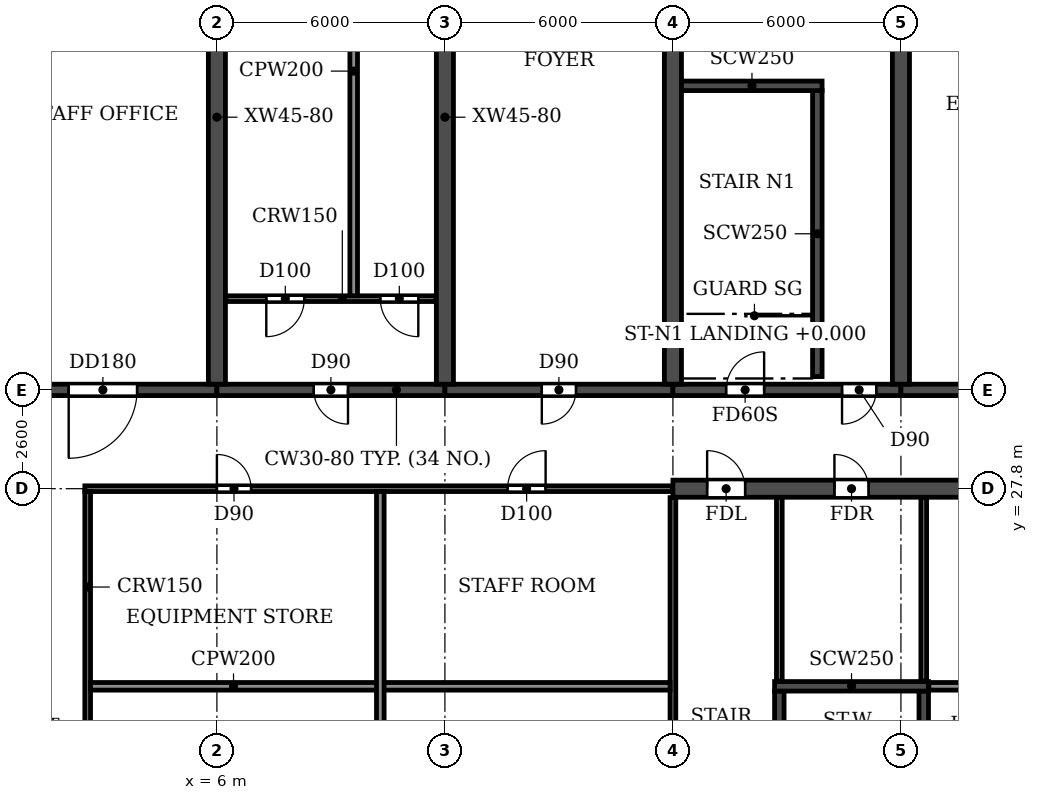
"""IFC4 building model, lengths in metres.
Left out: names, types, materials, properties, quantities, classifications, styles, units other than length and angle.
Written with IfcOpenShell. Run it as: python <this file> out.ifc"""

import sys

from ifc_helpers import new_model, si_unit, direction, frame, frame_2d, origin, place, context, subcontext, project, spatial, rectangle, extrude, element, fill, save


model = new_model("IFC4")
c1 = context("Model", 3, precision=1e-05, world=origin(), true_north=direction((0.0, 1.0)))
c2 = subcontext(c1, "Body", "Model", "MODEL_VIEW")
j1 = project(units=[si_unit("LENGTHUNIT", "METRE"), si_unit("PLANEANGLEUNIT", "RADIAN")], contexts=[c1])
p1 = place(None, origin())
s1 = spatial("IfcSite", under=j1, at=p1, CompositionType="ELEMENT")
p2 = place(p1, origin())
s2 = spatial("IfcBuilding", under=s1, at=p2, CompositionType="ELEMENT")
p3 = place(p2, frame((0.0, 0.0, 19.2)))
s3 = spatial("IfcBuildingStorey", under=s2, at=p3, CompositionType="ELEMENT", Elevation=19.2)
for number, where, z_axis, x_axis in (
    (1, (6.0, 30.55, 0.0), (0.0, 0.0, 1.0), (0.0, 1.0, 0.0)),
    (2, (12.0, 30.55, 0.0), (0.0, 0.0, 1.0), (0.0, 1.0, 0.0)),
    (3, (18.0, 30.55, 0.0), (0.0, 0.0, 1.0), (0.0, 1.0, 0.0)),
    (4, (24.0, 30.55, 0.0), (0.0, 0.0, 1.0), (0.0, 1.0, 0.0)),
):
    element("IfcWall", number, at=place(p3, frame(where, z_axis=z_axis, x_axis=x_axis)), inside=s3, PredefinedType="SHEAR", context=c2, shape_type="SweptSolid", body=[
        extrude(rectangle(XDim=14.05, YDim=0.45, at=frame_2d((7.025, 0.0))), origin(), (0.0, 0.0, 1.0), 3.95),
    ])
p4 = place(p3, frame((0.0, 30.4, 0.0), z_axis=(0.0, 0.0, 1.0), x_axis=(1.0, 0.0, 0.0)))
e5 = element("IfcWall", 5, at=p4, inside=s3, PredefinedType="SHEAR", context=c2, shape_type="SweptSolid", body=[
    extrude(rectangle(XDim=6.0, YDim=0.3, at=frame_2d((3.0, 0.0))), origin(), (0.0, 0.0, 1.0), 3.35),
])
p5 = place(p4, frame((2.1, 0.0, 0.0)))
e6 = element("IfcOpeningElement", 6, at=p5, cuts=e5, PredefinedType="OPENING", context=c2, shape_type="SweptSolid", body=[
    extrude(rectangle(XDim=1.8, YDim=2.1, at=frame_2d((0.9, 1.05))), frame((0.0, 0.16, 0.0), z_axis=(0.0, -1.0, 0.0), x_axis=(1.0, 0.0, 0.0)), (0.0, 0.0, 1.0), 0.32),
])
p6 = place(p3, frame((6.0, 30.4, 0.0), z_axis=(0.0, 0.0, 1.0), x_axis=(1.0, 0.0, 0.0)))
e7 = element("IfcWall", 7, at=p6, inside=s3, PredefinedType="SHEAR", context=c2, shape_type="SweptSolid", body=[
    extrude(rectangle(XDim=6.0, YDim=0.3, at=frame_2d((3.0, 0.0))), origin(), (0.0, 0.0, 1.0), 3.35),
])
p7 = place(p6, frame((2.55, 0.0, 0.0)))
e8 = element("IfcOpeningElement", 8, at=p7, cuts=e7, PredefinedType="OPENING", context=c2, shape_type="SweptSolid", body=[
    extrude(rectangle(XDim=0.9, YDim=2.1, at=frame_2d((0.45, 1.05))), frame((0.0, 0.16, 0.0), z_axis=(0.0, -1.0, 0.0), x_axis=(1.0, 0.0, 0.0)), (0.0, 0.0, 1.0), 0.32),
])
p8 = place(p3, frame((12.0, 30.4, 0.0), z_axis=(0.0, 0.0, 1.0), x_axis=(1.0, 0.0, 0.0)))
e9 = element("IfcWall", 9, at=p8, inside=s3, PredefinedType="SHEAR", context=c2, shape_type="SweptSolid", body=[
    extrude(rectangle(XDim=6.0, YDim=0.3, at=frame_2d((3.0, 0.0))), origin(), (0.0, 0.0, 1.0), 3.35),
])
p9 = place(p8, frame((2.55, 0.0, 0.0)))
e10 = element("IfcOpeningElement", 10, at=p9, cuts=e9, PredefinedType="OPENING", context=c2, shape_type="SweptSolid", body=[
    extrude(rectangle(XDim=0.9, YDim=2.1, at=frame_2d((0.45, 1.05))), frame((0.0, 0.16, 0.0), z_axis=(0.0, -1.0, 0.0), x_axis=(1.0, 0.0, 0.0)), (0.0, 0.0, 1.0), 0.32),
])
p10 = place(p3, frame((18.0, 30.4, 0.0), z_axis=(0.0, 0.0, 1.0), x_axis=(1.0, 0.0, 0.0)))
e11 = element("IfcWall", 11, at=p10, inside=s3, PredefinedType="SHEAR", context=c2, shape_type="SweptSolid", body=[
    extrude(rectangle(XDim=6.0, YDim=0.3, at=frame_2d((3.0, 0.0))), origin(), (0.0, 0.0, 1.0), 3.35),
])
p11 = place(p10, frame((1.4, 0.0, 0.0)))
e12 = element("IfcOpeningElement", 12, at=p11, cuts=e11, PredefinedType="OPENING", context=c2, shape_type="SweptSolid", body=[
    extrude(rectangle(XDim=1.0, YDim=2.1, at=frame_2d((0.5, 1.05))), frame((0.0, 0.16, 0.0), z_axis=(0.0, -1.0, 0.0), x_axis=(1.0, 0.0, 0.0)), (0.0, 0.0, 1.0), 0.32),
])
p12 = place(p10, frame((4.45, 0.0, 0.0)))
e13 = element("IfcOpeningElement", 13, at=p12, cuts=e11, PredefinedType="OPENING", context=c2, shape_type="SweptSolid", body=[
    extrude(rectangle(XDim=0.9, YDim=2.1, at=frame_2d((0.45, 1.05))), frame((0.0, 0.16, 0.0), z_axis=(0.0, -1.0, 0.0), x_axis=(1.0, 0.0, 0.0)), (0.0, 0.0, 1.0), 0.32),
])
p13 = place(p3, frame((24.0, 30.4, 0.0), z_axis=(0.0, 0.0, 1.0), x_axis=(1.0, 0.0, 0.0)))
e14 = element("IfcWall", 14, at=p13, inside=s3, PredefinedType="SHEAR", context=c2, shape_type="SweptSolid", body=[
    extrude(rectangle(XDim=6.0, YDim=0.3, at=frame_2d((3.0, 0.0))), origin(), (0.0, 0.0, 1.0), 3.35),
])
p14 = place(p13, frame((2.55, 0.0, 0.0)))
e15 = element("IfcOpeningElement", 15, at=p14, cuts=e14, PredefinedType="OPENING", context=c2, shape_type="SweptSolid", body=[
    extrude(rectangle(XDim=0.9, YDim=2.1, at=frame_2d((0.45, 1.05))), frame((0.0, 0.16, 0.0), z_axis=(0.0, -1.0, 0.0), x_axis=(1.0, 0.0, 0.0)), (0.0, 0.0, 1.0), 0.32),
])
p15 = place(p3, frame((18.0, 27.8, 0.0), z_axis=(0.0, 0.0, 1.0), x_axis=(1.0, 0.0, 0.0)))
e16 = element("IfcWall", 16, at=p15, inside=s3, PredefinedType="SOLIDWALL", context=c2, shape_type="SweptSolid", body=[
    extrude(rectangle(XDim=66.0, YDim=0.45, at=frame_2d((33.0, 0.0))), origin(), (0.0, 0.0, 1.0), 3.95),
])
p16 = place(p15, frame((0.9, 0.0, 0.0)))
e17 = element("IfcOpeningElement", 17, at=p16, cuts=e16, PredefinedType="OPENING", context=c2, shape_type="SweptSolid", body=[
    extrude(rectangle(XDim=1.0, YDim=2.1, at=frame_2d((0.5, 1.05))), frame((0.0, 0.235, 0.0), z_axis=(0.0, -1.0, 0.0), x_axis=(1.0, 0.0, 0.0)), (0.0, 0.0, 1.0), 0.47),
])
p17 = place(p15, frame((4.25, 0.0, 0.0)))
e18 = element("IfcOpeningElement", 18, at=p17, cuts=e16, PredefinedType="OPENING", context=c2, shape_type="SweptSolid", body=[
    extrude(rectangle(XDim=0.9, YDim=2.1, at=frame_2d((0.45, 1.05))), frame((0.0, 0.235, 0.0), z_axis=(0.0, -1.0, 0.0), x_axis=(1.0, 0.0, 0.0)), (0.0, 0.0, 1.0), 0.47),
])
p18 = place(p15, frame((8.8, 0.0, 0.0)))
e19 = element("IfcOpeningElement", 19, at=p18, cuts=e16, PredefinedType="OPENING", context=c2, shape_type="SweptSolid", body=[
    extrude(rectangle(XDim=1.0, YDim=2.1, at=frame_2d((0.5, 1.05))), frame((0.0, 0.235, 0.0), z_axis=(0.0, -1.0, 0.0), x_axis=(1.0, 0.0, 0.0)), (0.0, 0.0, 1.0), 0.47),
])
p19 = place(p15, frame((13.45, 0.0, 0.0)))
e20 = element("IfcOpeningElement", 20, at=p19, cuts=e16, PredefinedType="OPENING", context=c2, shape_type="SweptSolid", body=[
    extrude(rectangle(XDim=0.9, YDim=2.1, at=frame_2d((0.45, 1.05))), frame((0.0, 0.235, 0.0), z_axis=(0.0, -1.0, 0.0), x_axis=(1.0, 0.0, 0.0)), (0.0, 0.0, 1.0), 0.47),
])
p20 = place(p15, frame((17.9, 0.0, 0.0)))
e21 = element("IfcOpeningElement", 21, at=p20, cuts=e16, PredefinedType="OPENING", context=c2, shape_type="SweptSolid", body=[
    extrude(rectangle(XDim=1.0, YDim=2.1, at=frame_2d((0.5, 1.05))), frame((0.0, 0.235, 0.0), z_axis=(0.0, -1.0, 0.0), x_axis=(1.0, 0.0, 0.0)), (0.0, 0.0, 1.0), 0.47),
])
p21 = place(p15, frame((22.85, 0.0, 0.0)))
e22 = element("IfcOpeningElement", 22, at=p21, cuts=e16, PredefinedType="OPENING", context=c2, shape_type="SweptSolid", body=[
    extrude(rectangle(XDim=1.5, YDim=2.1, at=frame_2d((0.75, 1.05))), frame((0.0, 0.235, 0.0), z_axis=(0.0, -1.0, 0.0), x_axis=(1.0, 0.0, 0.0)), (0.0, 0.0, 1.0), 0.47),
])
p22 = place(p15, frame((29.6, 0.0, 0.0)))
e23 = element("IfcOpeningElement", 23, at=p22, cuts=e16, PredefinedType="OPENING", context=c2, shape_type="SweptSolid", body=[
    extrude(rectangle(XDim=1.0, YDim=2.1, at=frame_2d((0.5, 1.05))), frame((0.0, 0.235, 0.0), z_axis=(0.0, -1.0, 0.0), x_axis=(1.0, 0.0, 0.0)), (0.0, 0.0, 1.0), 0.47),
])
p23 = place(p15, frame((32.5, 0.0, 0.0)))
e24 = element("IfcOpeningElement", 24, at=p23, cuts=e16, PredefinedType="OPENING", context=c2, shape_type="SweptSolid", body=[
    extrude(rectangle(XDim=1.0, YDim=2.1, at=frame_2d((0.5, 1.05))), frame((0.0, 0.235, 0.0), z_axis=(0.0, -1.0, 0.0), x_axis=(1.0, 0.0, 0.0)), (0.0, 0.0, 1.0), 0.47),
])
p24 = place(p15, frame((38.0, 0.0, 0.0)))
e25 = element("IfcOpeningElement", 25, at=p24, cuts=e16, PredefinedType="OPENING", context=c2, shape_type="SweptSolid", body=[
    extrude(rectangle(XDim=1.0, YDim=2.1, at=frame_2d((0.5, 1.05))), frame((0.0, 0.235, 0.0), z_axis=(0.0, -1.0, 0.0), x_axis=(1.0, 0.0, 0.0)), (0.0, 0.0, 1.0), 0.47),
])
p25 = place(p15, frame((43.2, 0.0, 0.0)))
e26 = element("IfcOpeningElement", 26, at=p25, cuts=e16, PredefinedType="OPENING", context=c2, shape_type="SweptSolid", body=[
    extrude(rectangle(XDim=1.0, YDim=2.1, at=frame_2d((0.5, 1.05))), frame((0.0, 0.235, 0.0), z_axis=(0.0, -1.0, 0.0), x_axis=(1.0, 0.0, 0.0)), (0.0, 0.0, 1.0), 0.47),
])
p26 = place(p15, frame((47.1, 0.0, 0.0)))
e27 = element("IfcOpeningElement", 27, at=p26, cuts=e16, PredefinedType="OPENING", context=c2, shape_type="SweptSolid", body=[
    extrude(rectangle(XDim=1.0, YDim=2.1, at=frame_2d((0.5, 1.05))), frame((0.0, 0.235, 0.0), z_axis=(0.0, -1.0, 0.0), x_axis=(1.0, 0.0, 0.0)), (0.0, 0.0, 1.0), 0.47),
])
p27 = place(p15, frame((51.65, 0.0, 0.0)))
e28 = element("IfcOpeningElement", 28, at=p27, cuts=e16, PredefinedType="OPENING", context=c2, shape_type="SweptSolid", body=[
    extrude(rectangle(XDim=0.9, YDim=2.1, at=frame_2d((0.45, 1.05))), frame((0.0, 0.235, 0.0), z_axis=(0.0, -1.0, 0.0), x_axis=(1.0, 0.0, 0.0)), (0.0, 0.0, 1.0), 0.47),
])
p28 = place(p15, frame((56.2, 0.0, 0.0)))
e29 = element("IfcOpeningElement", 29, at=p28, cuts=e16, PredefinedType="OPENING", context=c2, shape_type="SweptSolid", body=[
    extrude(rectangle(XDim=1.0, YDim=2.1, at=frame_2d((0.5, 1.05))), frame((0.0, 0.235, 0.0), z_axis=(0.0, -1.0, 0.0), x_axis=(1.0, 0.0, 0.0)), (0.0, 0.0, 1.0), 0.47),
])
p29 = place(p15, frame((60.85, 0.0, 0.0)))
e30 = element("IfcOpeningElement", 30, at=p29, cuts=e16, PredefinedType="OPENING", context=c2, shape_type="SweptSolid", body=[
    extrude(rectangle(XDim=0.9, YDim=2.1, at=frame_2d((0.45, 1.05))), frame((0.0, 0.235, 0.0), z_axis=(0.0, -1.0, 0.0), x_axis=(1.0, 0.0, 0.0)), (0.0, 0.0, 1.0), 0.47),
])
p30 = place(p15, frame((64.1, 0.0, 0.0)))
e31 = element("IfcOpeningElement", 31, at=p30, cuts=e16, PredefinedType="OPENING", context=c2, shape_type="SweptSolid", body=[
    extrude(rectangle(XDim=1.0, YDim=2.1, at=frame_2d((0.5, 1.05))), frame((0.0, 0.235, 0.0), z_axis=(0.0, -1.0, 0.0), x_axis=(1.0, 0.0, 0.0)), (0.0, 0.0, 1.0), 0.47),
])
p31 = place(p3, frame((20.8, 14.825, 0.0), z_axis=(0.0, 0.0, 1.0), x_axis=(0.0, 1.0, 0.0)))
e32 = element("IfcWall", 32, at=p31, inside=s3, PredefinedType="SOLIDWALL", context=c2, shape_type="SweptSolid", body=[
    extrude(rectangle(XDim=7.65, YDim=0.25, at=frame_2d((3.825, 0.0))), origin(), (0.0, 0.0, 1.0), 3.95),
])
p32 = place(p31, frame((0.475, 0.0, 0.0)))
e33 = element("IfcOpeningElement", 33, at=p32, cuts=e32, PredefinedType="OPENING", context=c2, shape_type="SweptSolid", body=[
    extrude(rectangle(XDim=1.0, YDim=2.1, at=frame_2d((0.5, 1.05))), frame((0.0, 0.135, 0.0), z_axis=(0.0, -1.0, 0.0), x_axis=(1.0, 0.0, 0.0)), (0.0, 0.0, 1.0), 0.27),
])
p33 = place(p3, frame((24.6, 14.825, 0.0), z_axis=(0.0, 0.0, 1.0), x_axis=(0.0, 1.0, 0.0)))
e34 = element("IfcWall", 34, at=p33, inside=s3, PredefinedType="SOLIDWALL", context=c2, shape_type="SweptSolid", body=[
    extrude(rectangle(XDim=7.65, YDim=0.25, at=frame_2d((3.825, 0.0))), origin(), (0.0, 0.0, 1.0), 3.95),
])
p34 = place(p3, frame((20.675, 22.6, 0.0), z_axis=(0.0, 0.0, 1.0), x_axis=(1.0, 0.0, 0.0)))
e35 = element("IfcWall", 35, at=p34, inside=s3, PredefinedType="SOLIDWALL", context=c2, shape_type="SweptSolid", body=[
    extrude(rectangle(XDim=4.05, YDim=0.25, at=frame_2d((2.025, 0.0))), origin(), (0.0, 0.0, 1.0), 3.95),
])
p35 = place(p3, frame((21.8, 30.75, 0.0), z_axis=(0.0, 0.0, 1.0), x_axis=(0.0, 1.0, 0.0)))
e36 = element("IfcWall", 36, at=p35, inside=s3, PredefinedType="SOLIDWALL", context=c2, shape_type="SweptSolid", body=[
    extrude(rectangle(XDim=7.525, YDim=0.25, at=frame_2d((3.762, 0.0))), origin(), (0.0, 0.0, 1.0), 3.95),
])
p36 = place(p3, frame((18.0, 38.4, 0.0), z_axis=(0.0, 0.0, 1.0), x_axis=(1.0, 0.0, 0.0)))
e37 = element("IfcWall", 37, at=p36, inside=s3, PredefinedType="SOLIDWALL", context=c2, shape_type="SweptSolid", body=[
    extrude(rectangle(XDim=3.925, YDim=0.25, at=frame_2d((1.962, 0.0))), origin(), (0.0, 0.0, 1.0), 3.95),
])
p37 = place(p3, frame((2.525, 27.8, 0.0), z_axis=(0.0, 0.0, 1.0), x_axis=(1.0, 0.0, 0.0)))
e38 = element("IfcWall", 38, at=p37, inside=s3, PredefinedType="PARTITIONING", context=c2, shape_type="SweptSolid", body=[
    extrude(rectangle(XDim=15.465, YDim=0.15, at=frame_2d((7.732, 0.0))), origin(), (0.0, 0.0, 1.0), 3.95),
])
p38 = place(p37, frame((3.475, 0.0, 0.0)))
e39 = element("IfcOpeningElement", 39, at=p38, cuts=e38, PredefinedType="OPENING", context=c2, shape_type="SweptSolid", body=[
    extrude(rectangle(XDim=0.9, YDim=2.1, at=frame_2d((0.45, 1.05))), frame((0.0, 0.085, 0.0), z_axis=(0.0, -1.0, 0.0), x_axis=(1.0, 0.0, 0.0)), (0.0, 0.0, 1.0), 0.17),
])
p39 = place(p37, frame((11.125, 0.0, 0.0)))
e40 = element("IfcOpeningElement", 40, at=p39, cuts=e38, PredefinedType="OPENING", context=c2, shape_type="SweptSolid", body=[
    extrude(rectangle(XDim=1.0, YDim=2.1, at=frame_2d((0.5, 1.05))), frame((0.0, 0.085, 0.0), z_axis=(0.0, -1.0, 0.0), x_axis=(1.0, 0.0, 0.0)), (0.0, 0.0, 1.0), 0.17),
])
p40 = place(p3, frame((6.235, 32.8, 0.0), z_axis=(0.0, 0.0, 1.0), x_axis=(1.0, 0.0, 0.0)))
e41 = element("IfcWall", 41, at=p40, inside=s3, PredefinedType="PARTITIONING", context=c2, shape_type="SweptSolid", body=[
    extrude(rectangle(XDim=5.53, YDim=0.15, at=frame_2d((2.765, 0.0))), origin(), (0.0, 0.0, 1.0), 3.95),
])
p41 = place(p40, frame((1.065, 0.0, 0.0)))
e42 = element("IfcOpeningElement", 42, at=p41, cuts=e41, PredefinedType="OPENING", context=c2, shape_type="SweptSolid", body=[
    extrude(rectangle(XDim=1.0, YDim=2.1, at=frame_2d((0.5, 1.05))), frame((0.0, 0.085, 0.0), z_axis=(0.0, -1.0, 0.0), x_axis=(1.0, 0.0, 0.0)), (0.0, 0.0, 1.0), 0.17),
])
p42 = place(p40, frame((4.065, 0.0, 0.0)))
e43 = element("IfcOpeningElement", 43, at=p42, cuts=e41, PredefinedType="OPENING", context=c2, shape_type="SweptSolid", body=[
    extrude(rectangle(XDim=1.0, YDim=2.1, at=frame_2d((0.5, 1.05))), frame((0.0, 0.085, 0.0), z_axis=(0.0, -1.0, 0.0), x_axis=(1.0, 0.0, 0.0)), (0.0, 0.0, 1.0), 0.17),
])
p43 = place(p3, frame((2.6, 14.675, 0.0), z_axis=(0.0, 0.0, 1.0), x_axis=(0.0, 1.0, 0.0)))
e44 = element("IfcWall", 44, at=p43, inside=s3, PredefinedType="PARTITIONING", context=c2, shape_type="SweptSolid", body=[
    extrude(rectangle(XDim=13.05, YDim=0.15, at=frame_2d((6.525, 0.0))), origin(), (0.0, 0.0, 1.0), 3.95),
])
p44 = place(p43, frame((3.025, 0.0, 0.0)))
e45 = element("IfcOpeningElement", 45, at=p44, cuts=e44, PredefinedType="OPENING", context=c2, shape_type="SweptSolid", body=[
    extrude(rectangle(XDim=1.8, YDim=2.1, at=frame_2d((0.9, 1.05))), frame((0.0, 0.085, 0.0), z_axis=(0.0, -1.0, 0.0), x_axis=(1.0, 0.0, 0.0)), (0.0, 0.0, 1.0), 0.17),
])
p45 = place(p3, frame((18.0, 14.835, 0.0), z_axis=(0.0, 0.0, 1.0), x_axis=(0.0, 1.0, 0.0)))
e46 = element("IfcWall", 46, at=p45, inside=s3, PredefinedType="PARTITIONING", context=c2, shape_type="SweptSolid", body=[
    extrude(rectangle(XDim=12.73, YDim=0.15, at=frame_2d((6.365, 0.0))), origin(), (0.0, 0.0, 1.0), 3.95),
])
p46 = place(p3, frame((2.675, 22.6, 0.0), z_axis=(0.0, 0.0, 1.0), x_axis=(1.0, 0.0, 0.0)))
e47 = element("IfcWall", 47, at=p46, inside=s3, PredefinedType="PARTITIONING", context=c2, shape_type="SweptSolid", body=[
    extrude(rectangle(XDim=15.25, YDim=0.2, at=frame_2d((7.625, 0.0))), origin(), (0.0, 0.0, 1.0), 3.95),
])
p47 = place(p3, frame((24.735, 22.6, 0.0), z_axis=(0.0, 0.0, 1.0), x_axis=(1.0, 0.0, 0.0)))
e48 = element("IfcWall", 48, at=p47, inside=s3, PredefinedType="PARTITIONING", context=c2, shape_type="SweptSolid", body=[
    extrude(rectangle(XDim=5.13, YDim=0.2, at=frame_2d((2.565, 0.0))), origin(), (0.0, 0.0, 1.0), 3.95),
])
p48 = place(p3, frame((9.6, 32.875, 0.0), z_axis=(0.0, 0.0, 1.0), x_axis=(0.0, 1.0, 0.0)))
e49 = element("IfcWall", 49, at=p48, inside=s3, PredefinedType="PARTITIONING", context=c2, shape_type="SweptSolid", body=[
    extrude(rectangle(XDim=11.825, YDim=0.2, at=frame_2d((5.913, 0.0))), origin(), (0.0, 0.0, 1.0), 3.95),
])
p49 = place(p3, frame((10.3, 14.675, 0.0), z_axis=(0.0, 0.0, 1.0), x_axis=(0.0, 1.0, 0.0)))
e50 = element("IfcWall", 50, at=p49, inside=s3, PredefinedType="PARTITIONING", context=c2, shape_type="SweptSolid", body=[
    extrude(rectangle(XDim=13.05, YDim=0.2, at=frame_2d((6.525, 0.0))), origin(), (0.0, 0.0, 1.0), 3.95),
])
for number, where, z_axis, x_axis in (
    (51, (20.8, 22.735, 0.0), (0.0, 0.0, 1.0), (0.0, 1.0, 0.0)),
    (52, (24.6, 22.735, 0.0), (0.0, 0.0, 1.0), (0.0, 1.0, 0.0)),
):
    element("IfcWall", number, at=place(p3, frame(where, z_axis=z_axis, x_axis=x_axis)), inside=s3, PredefinedType="PARTITIONING", context=c2, shape_type="SweptSolid", body=[
        extrude(rectangle(XDim=4.83, YDim=0.15, at=frame_2d((2.415, 0.0))), origin(), (0.0, 0.0, 1.0), 3.95),
    ])
p50 = place(p5, frame((1.8, 0.0, 0.0), z_axis=(0.0, 0.0, 1.0), x_axis=(-1.0, 0.0, 0.0)))
e53 = element("IfcDoor", 53, at=p50, inside=s3, OperationType="DOUBLE_DOOR_SINGLE_SWING", PredefinedType="DOOR", context=c2, shape_type="SweptSolid", body=[
    extrude(rectangle(XDim=1.8, YDim=2.1, at=frame_2d((0.9, 1.05))), frame((0.0, 0.025, 0.0), z_axis=(0.0, -1.0, 0.0), x_axis=(1.0, 0.0, 0.0)), (0.0, 0.0, 1.0), 0.05),
])
fill(e6, e53)
p51 = place(p38, origin())
e54 = element("IfcDoor", 54, at=p51, inside=s3, OperationType="SINGLE_SWING_LEFT", PredefinedType="DOOR", context=c2, shape_type="SweptSolid", body=[
    extrude(rectangle(XDim=0.9, YDim=2.1, at=frame_2d((0.45, 1.05))), frame((0.0, 0.025, 0.0), z_axis=(0.0, -1.0, 0.0), x_axis=(1.0, 0.0, 0.0)), (0.0, 0.0, 1.0), 0.05),
])
fill(e39, e54)
p52 = place(p7, frame((0.9, 0.0, 0.0), z_axis=(0.0, 0.0, 1.0), x_axis=(-1.0, 0.0, 0.0)))
e55 = element("IfcDoor", 55, at=p52, inside=s3, OperationType="SINGLE_SWING_LEFT", PredefinedType="DOOR", context=c2, shape_type="SweptSolid", body=[
    extrude(rectangle(XDim=0.9, YDim=2.1, at=frame_2d((0.45, 1.05))), frame((0.0, 0.025, 0.0), z_axis=(0.0, -1.0, 0.0), x_axis=(1.0, 0.0, 0.0)), (0.0, 0.0, 1.0), 0.05),
])
fill(e8, e55)
p53 = place(p39, origin())
e56 = element("IfcDoor", 56, at=p53, inside=s3, OperationType="SINGLE_SWING_RIGHT", PredefinedType="DOOR", context=c2, shape_type="SweptSolid", body=[
    extrude(rectangle(XDim=1.0, YDim=2.1, at=frame_2d((0.5, 1.05))), frame((0.0, 0.025, 0.0), z_axis=(0.0, -1.0, 0.0), x_axis=(1.0, 0.0, 0.0)), (0.0, 0.0, 1.0), 0.05),
])
fill(e40, e56)
p54 = place(p9, frame((0.9, 0.0, 0.0), z_axis=(0.0, 0.0, 1.0), x_axis=(-1.0, 0.0, 0.0)))
e57 = element("IfcDoor", 57, at=p54, inside=s3, OperationType="SINGLE_SWING_RIGHT", PredefinedType="DOOR", context=c2, shape_type="SweptSolid", body=[
    extrude(rectangle(XDim=0.9, YDim=2.1, at=frame_2d((0.45, 1.05))), frame((0.0, 0.025, 0.0), z_axis=(0.0, -1.0, 0.0), x_axis=(1.0, 0.0, 0.0)), (0.0, 0.0, 1.0), 0.05),
])
fill(e10, e57)
p55 = place(p16, origin())
e58 = element("IfcDoor", 58, at=p55, inside=s3, OperationType="SINGLE_SWING_LEFT", PredefinedType="DOOR", context=c2, shape_type="SweptSolid", body=[
    extrude(rectangle(XDim=1.0, YDim=2.1, at=frame_2d((0.5, 1.05))), frame((0.0, 0.025, 0.0), z_axis=(0.0, -1.0, 0.0), x_axis=(1.0, 0.0, 0.0)), (0.0, 0.0, 1.0), 0.05),
])
fill(e17, e58)
p56 = place(p11, origin())
e59 = element("IfcDoor", 59, at=p56, inside=s3, OperationType="SINGLE_SWING_RIGHT", PredefinedType="DOOR", context=c2, shape_type="SweptSolid", body=[
    extrude(rectangle(XDim=1.0, YDim=2.1, at=frame_2d((0.5, 1.05))), frame((0.0, 0.025, 0.0), z_axis=(0.0, -1.0, 0.0), x_axis=(1.0, 0.0, 0.0)), (0.0, 0.0, 1.0), 0.05),
])
fill(e12, e59)
p57 = place(p17, origin())
e60 = element("IfcDoor", 60, at=p57, inside=s3, OperationType="SINGLE_SWING_LEFT", PredefinedType="DOOR", context=c2, shape_type="SweptSolid", body=[
    extrude(rectangle(XDim=0.9, YDim=2.1, at=frame_2d((0.45, 1.05))), frame((0.0, 0.025, 0.0), z_axis=(0.0, -1.0, 0.0), x_axis=(1.0, 0.0, 0.0)), (0.0, 0.0, 1.0), 0.05),
])
fill(e18, e60)
p58 = place(p12, frame((0.9, 0.0, 0.0), z_axis=(0.0, 0.0, 1.0), x_axis=(-1.0, 0.0, 0.0)))
e61 = element("IfcDoor", 61, at=p58, inside=s3, OperationType="SINGLE_SWING_RIGHT", PredefinedType="DOOR", context=c2, shape_type="SweptSolid", body=[
    extrude(rectangle(XDim=0.9, YDim=2.1, at=frame_2d((0.45, 1.05))), frame((0.0, 0.025, 0.0), z_axis=(0.0, -1.0, 0.0), x_axis=(1.0, 0.0, 0.0)), (0.0, 0.0, 1.0), 0.05),
])
fill(e13, e61)
p59 = place(p41, frame((1.0, 0.0, 0.0), z_axis=(0.0, 0.0, 1.0), x_axis=(-1.0, 0.0, 0.0)))
e62 = element("IfcDoor", 62, at=p59, inside=s3, OperationType="SINGLE_SWING_RIGHT", PredefinedType="DOOR", context=c2, shape_type="SweptSolid", body=[
    extrude(rectangle(XDim=1.0, YDim=2.1, at=frame_2d((0.5, 1.05))), frame((0.0, 0.025, 0.0), z_axis=(0.0, -1.0, 0.0), x_axis=(1.0, 0.0, 0.0)), (0.0, 0.0, 1.0), 0.05),
])
fill(e42, e62)
p60 = place(p42, frame((1.0, 0.0, 0.0), z_axis=(0.0, 0.0, 1.0), x_axis=(-1.0, 0.0, 0.0)))
e63 = element("IfcDoor", 63, at=p60, inside=s3, OperationType="SINGLE_SWING_LEFT", PredefinedType="DOOR", context=c2, shape_type="SweptSolid", body=[
    extrude(rectangle(XDim=1.0, YDim=2.1, at=frame_2d((0.5, 1.05))), frame((0.0, 0.025, 0.0), z_axis=(0.0, -1.0, 0.0), x_axis=(1.0, 0.0, 0.0)), (0.0, 0.0, 1.0), 0.05),
])
fill(e43, e63)
save(model, sys.argv[1])
